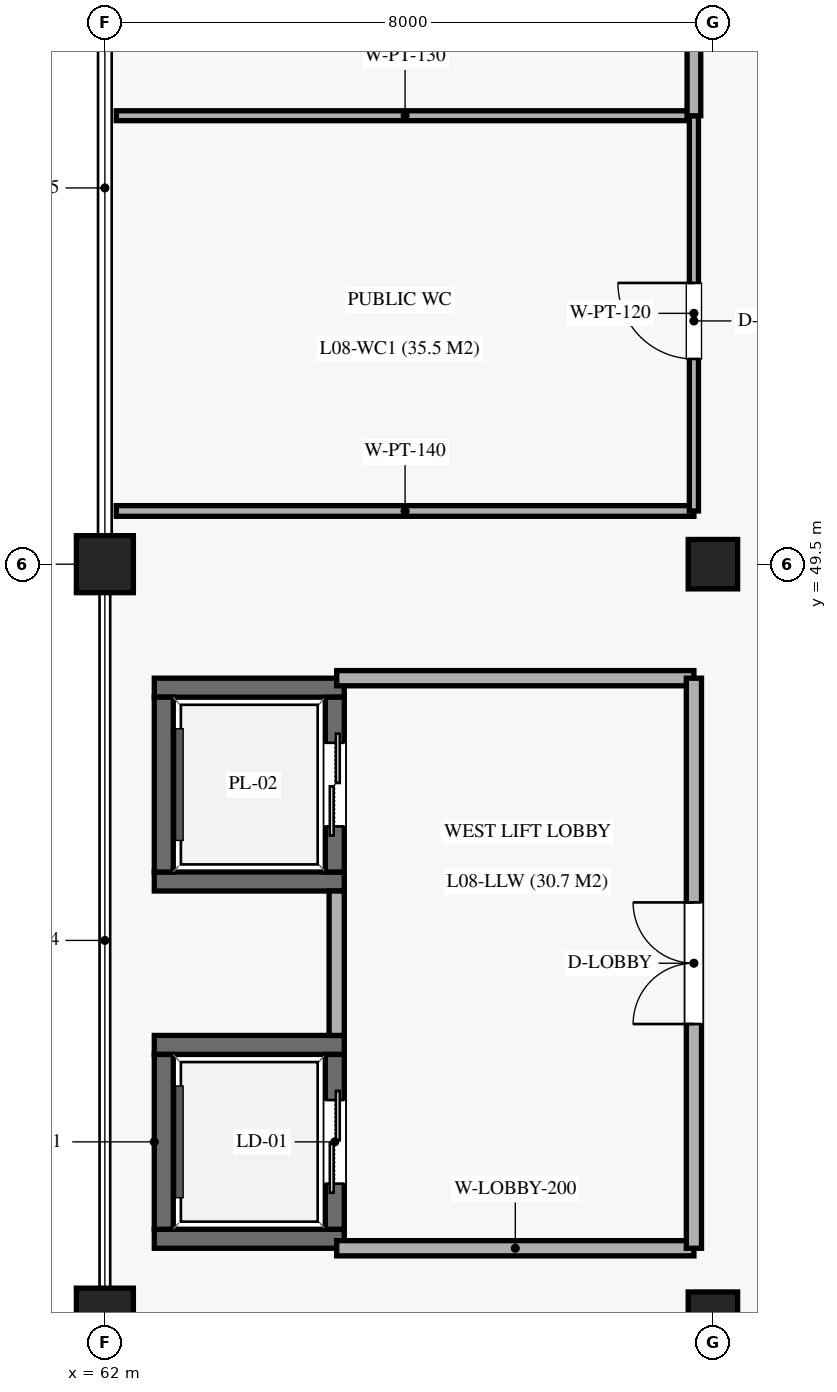
"""IFC4 building model, lengths in metres.
Left out: names, types, materials, properties, quantities, classifications, styles, units other than length and angle.
Written with IfcOpenShell. Run it as: python <this file> out.ifc"""

import sys

from ifc_helpers import new_model, si_unit, direction, frame, frame_2d, origin, origin_2d, place, context, subcontext, project, spatial, rectangle, extrude, element, fill, save


model = new_model("IFC4")
c1 = context("Model", 3, precision=1e-05, world=origin(), true_north=direction((0.0, 1.0)))
c2 = subcontext(c1, "Body", "Model", "MODEL_VIEW")
j1 = project(units=[si_unit("LENGTHUNIT", "METRE"), si_unit("PLANEANGLEUNIT", "RADIAN")], contexts=[c1])
p1 = place(None, origin())
s1 = spatial("IfcSite", under=j1, at=p1, CompositionType="ELEMENT")
p2 = place(p1, origin())
s2 = spatial("IfcBuilding", under=s1, at=p2, CompositionType="ELEMENT")
p3 = place(p2, frame((0.0, 0.0, 42.33)))
s3 = spatial("IfcBuildingStorey", under=s2, at=p3, CompositionType="ELEMENT", Elevation=42.33)
for number, where, z_axis, x_axis in (
    (1, (62.0, 39.6, 0.0), (0.0, 0.0, 1.0), (1.0, 0.0, 0.0)),
    (2, (62.0, 49.5, 0.0), (0.0, 0.0, 1.0), (1.0, 0.0, 0.0)),
):
    element("IfcColumn", number, at=place(p3, frame(where, z_axis=z_axis, x_axis=x_axis)), inside=s3, PredefinedType="COLUMN", context=c2, shape_type="SweptSolid", body=[
        extrude(rectangle(XDim=0.75, YDim=0.75, at=origin_2d()), origin(), (0.0, 0.0, 1.0), 4.59),
    ])
for number, where, z_axis, x_axis in (
    (3, (70.0, 39.6, 0.0), (0.0, 0.0, 1.0), (1.0, 0.0, 0.0)),
    (4, (70.0, 49.5, 0.0), (0.0, 0.0, 1.0), (1.0, 0.0, 0.0)),
):
    element("IfcColumn", number, at=place(p3, frame(where, z_axis=z_axis, x_axis=x_axis)), inside=s3, PredefinedType="COLUMN", context=c2, shape_type="SweptSolid", body=[
        extrude(rectangle(XDim=0.65, YDim=0.65, at=origin_2d()), origin(), (0.0, 0.0, 1.0), 4.59),
    ])
for number, where, z_axis, x_axis in (
    (5, (62.65, 40.625, 0.0), (0.0, 0.0, 1.0), (1.0, 0.0, 0.0)),
    (6, (62.65, 43.175, 0.0), (0.0, 0.0, 1.0), (1.0, 0.0, 0.0)),
):
    element("IfcWall", number, at=place(p3, frame(where, z_axis=z_axis, x_axis=x_axis)), inside=s3, PredefinedType="SOLIDWALL", context=c2, shape_type="SweptSolid", body=[
        extrude(rectangle(XDim=2.5, YDim=0.25, at=frame_2d((1.25, 0.0))), origin(), (0.0, 0.0, 1.0), 4.32),
    ])
p4 = place(p3, frame((62.775, 40.75, 0.0), z_axis=(0.0, 0.0, 1.0), x_axis=(0.0, 1.0, 0.0)))
e7 = element("IfcWall", 7, at=p4, inside=s3, PredefinedType="SOLIDWALL", context=c2, shape_type="SweptSolid", body=[
    extrude(rectangle(XDim=2.3, YDim=0.25, at=frame_2d((1.15, 0.0))), origin(), (0.0, 0.0, 1.0), 4.32),
])
p5 = place(p3, frame((65.025, 40.75, 0.0), z_axis=(0.0, 0.0, 1.0), x_axis=(0.0, 1.0, 0.0)))
e8 = element("IfcWall", 8, at=p5, inside=s3, PredefinedType="SOLIDWALL", context=c2, shape_type="SweptSolid", body=[
    extrude(rectangle(XDim=2.3, YDim=0.25, at=frame_2d((1.15, 0.0))), origin(), (0.0, 0.0, 1.0), 4.32),
])
p6 = place(p5, frame((0.6, 0.0, 0.0)))
e9 = element("IfcOpeningElement", 9, at=p6, cuts=e8, PredefinedType="OPENING", context=c2, shape_type="SweptSolid", body=[
    extrude(rectangle(XDim=1.1, YDim=2.2, at=frame_2d((0.55, 1.1))), frame((0.0, 0.135, 0.0), z_axis=(0.0, -1.0, 0.0), x_axis=(1.0, 0.0, 0.0)), (0.0, 0.0, 1.0), 0.27),
])
for number, where, z_axis, x_axis in (
    (10, (62.65, 45.325, 0.0), (0.0, 0.0, 1.0), (1.0, 0.0, 0.0)),
    (11, (62.65, 47.875, 0.0), (0.0, 0.0, 1.0), (1.0, 0.0, 0.0)),
):
    element("IfcWall", number, at=place(p3, frame(where, z_axis=z_axis, x_axis=x_axis)), inside=s3, PredefinedType="SOLIDWALL", context=c2, shape_type="SweptSolid", body=[
        extrude(rectangle(XDim=2.5, YDim=0.25, at=frame_2d((1.25, 0.0))), origin(), (0.0, 0.0, 1.0), 4.32),
    ])
p7 = place(p3, frame((62.775, 45.45, 0.0), z_axis=(0.0, 0.0, 1.0), x_axis=(0.0, 1.0, 0.0)))
e12 = element("IfcWall", 12, at=p7, inside=s3, PredefinedType="SOLIDWALL", context=c2, shape_type="SweptSolid", body=[
    extrude(rectangle(XDim=2.3, YDim=0.25, at=frame_2d((1.15, 0.0))), origin(), (0.0, 0.0, 1.0), 4.32),
])
p8 = place(p3, frame((65.025, 45.45, 0.0), z_axis=(0.0, 0.0, 1.0), x_axis=(0.0, 1.0, 0.0)))
e13 = element("IfcWall", 13, at=p8, inside=s3, PredefinedType="SOLIDWALL", context=c2, shape_type="SweptSolid", body=[
    extrude(rectangle(XDim=2.3, YDim=0.25, at=frame_2d((1.15, 0.0))), origin(), (0.0, 0.0, 1.0), 4.32),
])
p9 = place(p8, frame((0.6, 0.0, 0.0)))
e14 = element("IfcOpeningElement", 14, at=p9, cuts=e13, PredefinedType="OPENING", context=c2, shape_type="SweptSolid", body=[
    extrude(rectangle(XDim=1.1, YDim=2.2, at=frame_2d((0.55, 1.1))), frame((0.0, 0.135, 0.0), z_axis=(0.0, -1.0, 0.0), x_axis=(1.0, 0.0, 0.0)), (0.0, 0.0, 1.0), 0.27),
])
for number, where, z_axis, x_axis in (
    (15, (65.05, 40.5, 0.0), (0.0, 0.0, 1.0), (1.0, 0.0, 0.0)),
    (16, (65.05, 48.0, 0.0), (0.0, 0.0, 1.0), (1.0, 0.0, 0.0)),
):
    element("IfcWall", number, at=place(p3, frame(where, z_axis=z_axis, x_axis=x_axis)), inside=s3, PredefinedType="SOLIDWALL", context=c2, shape_type="SweptSolid", body=[
        extrude(rectangle(XDim=4.7, YDim=0.2, at=frame_2d((2.35, 0.0))), origin(), (0.0, 0.0, 1.0), 3.46),
    ])
p10 = place(p3, frame((65.05, 43.3, 0.0), z_axis=(0.0, 0.0, 1.0), x_axis=(0.0, 1.0, 0.0)))
e17 = element("IfcWall", 17, at=p10, inside=s3, PredefinedType="SOLIDWALL", context=c2, shape_type="SweptSolid", body=[
    extrude(rectangle(XDim=1.9, YDim=0.2, at=frame_2d((0.95, 0.0))), origin(), (0.0, 0.0, 1.0), 3.46),
])
p11 = place(p3, frame((69.75, 40.5, 0.0), z_axis=(0.0, 0.0, 1.0), x_axis=(0.0, 1.0, 0.0)))
e18 = element("IfcWall", 18, at=p11, inside=s3, PredefinedType="SOLIDWALL", context=c2, shape_type="SweptSolid", body=[
    extrude(rectangle(XDim=7.5, YDim=0.2, at=frame_2d((3.75, 0.0))), origin(), (0.0, 0.0, 1.0), 3.46),
])
p12 = place(p11, frame((2.95, 0.0, 0.0)))
e19 = element("IfcOpeningElement", 19, at=p12, cuts=e18, PredefinedType="OPENING", context=c2, shape_type="SweptSolid", body=[
    extrude(rectangle(XDim=1.6, YDim=2.2, at=frame_2d((0.8, 1.1))), frame((0.0, 0.11, 0.0), z_axis=(0.0, -1.0, 0.0), x_axis=(1.0, 0.0, 0.0)), (0.0, 0.0, 1.0), 0.22),
])
p13 = place(p3, frame((62.15, 50.2, 0.0), z_axis=(0.0, 0.0, 1.0), x_axis=(1.0, 0.0, 0.0)))
e20 = element("IfcWall", 20, at=p13, inside=s3, PredefinedType="PARTITIONING", context=c2, shape_type="SweptSolid", body=[
    extrude(rectangle(XDim=7.6, YDim=0.14, at=frame_2d((3.8, 0.0))), origin(), (0.0, 0.0, 1.0), 3.46),
])
p14 = place(p3, frame((62.15, 55.4, 0.0), z_axis=(0.0, 0.0, 1.0), x_axis=(1.0, 0.0, 0.0)))
e21 = element("IfcWall", 21, at=p14, inside=s3, PredefinedType="PARTITIONING", context=c2, shape_type="SweptSolid", body=[
    extrude(rectangle(XDim=7.6, YDim=0.13, at=frame_2d((3.8, 0.0))), origin(), (0.0, 0.0, 1.0), 3.46),
])
p15 = place(p3, frame((69.75, 50.2, 0.0), z_axis=(0.0, 0.0, 1.0), x_axis=(0.0, 1.0, 0.0)))
e22 = element("IfcWall", 22, at=p15, inside=s3, PredefinedType="PARTITIONING", context=c2, shape_type="SweptSolid", body=[
    extrude(rectangle(XDim=5.2, YDim=0.12, at=frame_2d((2.6, 0.0))), origin(), (0.0, 0.0, 1.0), 3.46),
])
p16 = place(p15, frame((2.0, 0.0, 0.0)))
e23 = element("IfcOpeningElement", 23, at=p16, cuts=e22, PredefinedType="OPENING", context=c2, shape_type="SweptSolid", body=[
    extrude(rectangle(XDim=1.0, YDim=2.1, at=frame_2d((0.5, 1.05))), frame((0.0, 0.07, 0.0), z_axis=(0.0, -1.0, 0.0), x_axis=(1.0, 0.0, 0.0)), (0.0, 0.0, 1.0), 0.14),
])
p17 = place(p3, frame((69.75, 55.4, 0.0), z_axis=(0.0, 0.0, 1.0), x_axis=(0.0, 1.0, 0.0)))
e24 = element("IfcWall", 24, at=p17, inside=s3, PredefinedType="PARTITIONING", context=c2, shape_type="SweptSolid", body=[
    extrude(rectangle(XDim=3.5, YDim=0.18, at=frame_2d((1.75, 0.0))), origin(), (0.0, 0.0, 1.0), 3.46),
])
p18 = place(p17, frame((1.15, 0.0, 0.0)))
e25 = element("IfcOpeningElement", 25, at=p18, cuts=e24, PredefinedType="OPENING", context=c2, shape_type="SweptSolid", body=[
    extrude(rectangle(XDim=1.05, YDim=2.15, at=frame_2d((0.525, 1.075))), frame((0.0, 0.1, 0.0), z_axis=(0.0, -1.0, 0.0), x_axis=(1.0, 0.0, 0.0)), (0.0, 0.0, 1.0), 0.2),
])
p19 = place(p6, origin())
e26 = element("IfcDoor", 26, at=p19, inside=s3, OperationType="DOUBLE_DOOR_SLIDING", PredefinedType="DOOR", context=c2, shape_type="SweptSolid", body=[
    extrude(rectangle(XDim=1.1, YDim=2.2, at=frame_2d((0.55, 1.1))), frame((0.0, 0.025, 0.0), z_axis=(0.0, -1.0, 0.0), x_axis=(1.0, 0.0, 0.0)), (0.0, 0.0, 1.0), 0.05),
])
fill(e9, e26)
p20 = place(p9, origin())
e27 = element("IfcDoor", 27, at=p20, inside=s3, OperationType="DOUBLE_DOOR_SLIDING", PredefinedType="DOOR", context=c2, shape_type="SweptSolid", body=[
    extrude(rectangle(XDim=1.1, YDim=2.2, at=frame_2d((0.55, 1.1))), frame((0.0, 0.025, 0.0), z_axis=(0.0, -1.0, 0.0), x_axis=(1.0, 0.0, 0.0)), (0.0, 0.0, 1.0), 0.05),
])
fill(e14, e27)
p21 = place(p12, origin())
e28 = element("IfcDoor", 28, at=p21, inside=s3, OperationType="DOUBLE_DOOR_SINGLE_SWING", PredefinedType="DOOR", context=c2, shape_type="SweptSolid", body=[
    extrude(rectangle(XDim=1.6, YDim=2.2, at=frame_2d((0.8, 1.1))), frame((0.0, 0.025, 0.0), z_axis=(0.0, -1.0, 0.0), x_axis=(1.0, 0.0, 0.0)), (0.0, 0.0, 1.0), 0.05),
])
fill(e19, e28)
p22 = place(p16, origin())
e29 = element("IfcDoor", 29, at=p22, inside=s3, OperationType="SINGLE_SWING_RIGHT", PredefinedType="DOOR", context=c2, shape_type="SweptSolid", body=[
    extrude(rectangle(XDim=1.0, YDim=2.1, at=frame_2d((0.5, 1.05))), frame((0.0, 0.025, 0.0), z_axis=(0.0, -1.0, 0.0), x_axis=(1.0, 0.0, 0.0)), (0.0, 0.0, 1.0), 0.05),
])
fill(e23, e29)
save(model, sys.argv[1])
